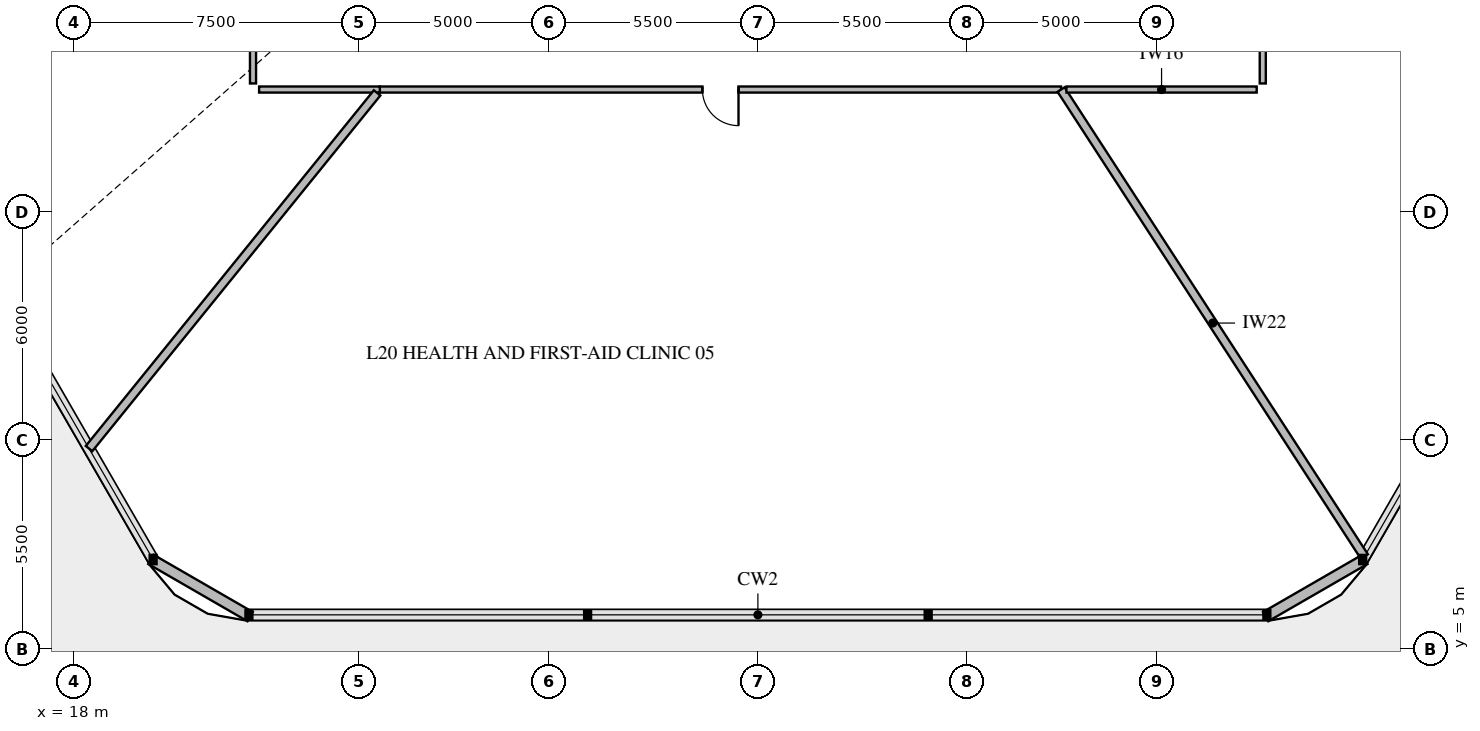
"""IFC4 building model, lengths in metres.
Left out: names, types, materials, properties, quantities, classifications, styles, units other than length and angle.
Written with IfcOpenShell. Run it as: python <this file> out.ifc"""

import sys

from ifc_helpers import new_model, si_unit, direction, frame, frame_2d, origin, place, context, subcontext, project, spatial, rectangle, extrude, element, fill, save


model = new_model("IFC4")
c1 = context("Model", 3, precision=1e-05, world=origin(), true_north=direction((0.0, 1.0)))
c2 = subcontext(c1, "Body", "Model", "MODEL_VIEW")
j1 = project(units=[si_unit("LENGTHUNIT", "METRE"), si_unit("PLANEANGLEUNIT", "RADIAN")], contexts=[c1])
p1 = place(None, origin())
s1 = spatial("IfcSite", under=j1, at=p1, CompositionType="ELEMENT")
p2 = place(p1, origin())
s2 = spatial("IfcBuilding", under=s1, at=p2, CompositionType="ELEMENT")
p3 = place(p2, frame((0.0, 0.0, 83.4)))
s3 = spatial("IfcBuildingStorey", under=s2, at=p3, CompositionType="ELEMENT", Elevation=83.4)
for number, where, z_axis, x_axis in (
    (1, (51.971, 7.352, 0.0), (0.0, 0.0, 1.0), (-0.866, -0.5, 0.0)),
    (2, (22.64, 5.844, 0.0), (0.0, 0.0, 1.0), (-0.866, 0.5, 0.0)),
):
    element("IfcWall", number, at=place(p3, frame(where, z_axis=z_axis, x_axis=x_axis)), inside=s3, PredefinedType="SOLIDWALL", context=c2, shape_type="SweptSolid", body=[
        extrude(rectangle(XDim=3.015, YDim=0.28, at=frame_2d((1.508, 0.0))), origin(), (0.0, 0.0, 1.0), 3.85),
    ])
p4 = place(p3, frame((22.715, 34.104, 0.0), z_axis=(0.0, 0.0, 1.0), x_axis=(0.0, -1.0, 0.0)))
e3 = element("IfcWall", 3, at=p4, inside=s3, PredefinedType="PARTITIONING", context=c2, shape_type="SweptSolid", body=[
    extrude(rectangle(XDim=14.229, YDim=0.16, at=frame_2d((7.115, 0.0))), origin(), (0.0, 0.0, 1.0), 3.15),
])
p5 = place(p4, frame((6.54, 0.0, 0.0)))
e4 = element("IfcOpeningElement", 4, at=p5, cuts=e3, PredefinedType="OPENING", context=c2, shape_type="SweptSolid", body=[
    extrude(rectangle(XDim=1.15, YDim=2.2, at=frame_2d((0.575, 1.1))), frame((0.0, 0.092, 0.0), z_axis=(0.0, -1.0, 0.0), x_axis=(1.0, 0.0, 0.0)), (0.0, 0.0, 1.0), 0.184),
])
p6 = place(p3, frame((26.052, 19.715, 0.0), z_axis=(0.0, 0.0, 1.0), x_axis=(1.0, 0.0, 0.0)))
e5 = element("IfcWall", 5, at=p6, inside=s3, PredefinedType="PARTITIONING", context=c2, shape_type="SweptSolid", body=[
    extrude(rectangle(XDim=17.926, YDim=0.16, at=frame_2d((8.963, 0.0))), origin(), (0.0, 0.0, 1.0), 3.15),
])
p7 = place(p6, frame((8.488, 0.0, 0.0)))
e6 = element("IfcOpeningElement", 6, at=p7, cuts=e5, PredefinedType="OPENING", context=c2, shape_type="SweptSolid", body=[
    extrude(rectangle(XDim=0.95, YDim=2.1, at=frame_2d((0.475, 1.05))), frame((0.0, 0.092, 0.0), z_axis=(0.0, -1.0, 0.0), x_axis=(1.0, 0.0, 0.0)), (0.0, 0.0, 1.0), 0.184),
])
p8 = place(p3, frame((49.285, 19.875, 0.0), z_axis=(0.0, 0.0, 1.0), x_axis=(0.0, 1.0, 0.0)))
e7 = element("IfcWall", 7, at=p8, inside=s3, PredefinedType="PARTITIONING", context=c2, shape_type="SweptSolid", body=[
    extrude(rectangle(XDim=15.685, YDim=0.16, at=frame_2d((7.842, 0.0))), origin(), (0.0, 0.0, 1.0), 3.15),
])
p9 = place(p8, frame((7.367, 0.0, 0.0)))
e8 = element("IfcOpeningElement", 8, at=p9, cuts=e7, PredefinedType="OPENING", context=c2, shape_type="SweptSolid", body=[
    extrude(rectangle(XDim=0.95, YDim=2.1, at=frame_2d((0.475, 1.05))), frame((0.0, 0.092, 0.0), z_axis=(0.0, -1.0, 0.0), x_axis=(1.0, 0.0, 0.0)), (0.0, 0.0, 1.0), 0.184),
])
p10 = place(p3, frame((22.875, 19.715, 0.0), z_axis=(0.0, 0.0, 1.0), x_axis=(1.0, 0.0, 0.0)))
e9 = element("IfcWall", 9, at=p10, inside=s3, PredefinedType="PARTITIONING", context=c2, shape_type="SweptSolid", body=[
    extrude(rectangle(XDim=3.177, YDim=0.16, at=frame_2d((1.588, 0.0))), origin(), (0.0, 0.0, 1.0), 3.15),
])
p11 = place(p3, frame((25.98, 19.627, 0.0), z_axis=(0.0, 0.0, 1.0), x_axis=(-0.629321252665, -0.777145263734, 0.0)))
e10 = element("IfcWall", 10, at=p11, inside=s3, PredefinedType="PARTITIONING", context=c2, shape_type="SweptSolid", body=[
    extrude(rectangle(XDim=12.045, YDim=0.22, at=frame_2d((6.022, 0.0))), origin(), (0.0, 0.0, 1.0), 3.4),
])
p12 = place(p3, frame((43.978, 19.715, 0.0), z_axis=(0.0, 0.0, 1.0), x_axis=(0.54462522792, -0.838679534216, 0.0)))
e11 = element("IfcWall", 11, at=p12, inside=s3, PredefinedType="PARTITIONING", context=c2, shape_type="SweptSolid", body=[
    extrude(rectangle(XDim=14.654, YDim=0.22, at=frame_2d((7.327, 0.0))), origin(), (0.0, 0.0, 1.0), 3.1),
])
p13 = place(p3, frame((44.119, 19.715, 0.0), z_axis=(0.0, 0.0, 1.0), x_axis=(1.0, 0.0, 0.0)))
e12 = element("IfcWall", 12, at=p13, inside=s3, PredefinedType="PARTITIONING", context=c2, shape_type="SweptSolid", body=[
    extrude(rectangle(XDim=5.006, YDim=0.16, at=frame_2d((2.503, 0.0))), origin(), (0.0, 0.0, 1.0), 3.15),
])
p14 = place(p7, frame((0.95, 0.0, 0.0), z_axis=(0.0, 0.0, 1.0), x_axis=(-1.0, 0.0, 0.0)))
e13 = element("IfcDoor", 13, at=p14, inside=s3, OperationType="SINGLE_SWING_LEFT", PredefinedType="DOOR", context=c2, shape_type="SweptSolid", body=[
    extrude(rectangle(XDim=0.95, YDim=2.1, at=frame_2d((0.475, 1.05))), frame((0.0, 0.025, 0.0), z_axis=(0.0, -1.0, 0.0), x_axis=(1.0, 0.0, 0.0)), (0.0, 0.0, 1.0), 0.05),
])
fill(e6, e13)
save(model, sys.argv[1])
